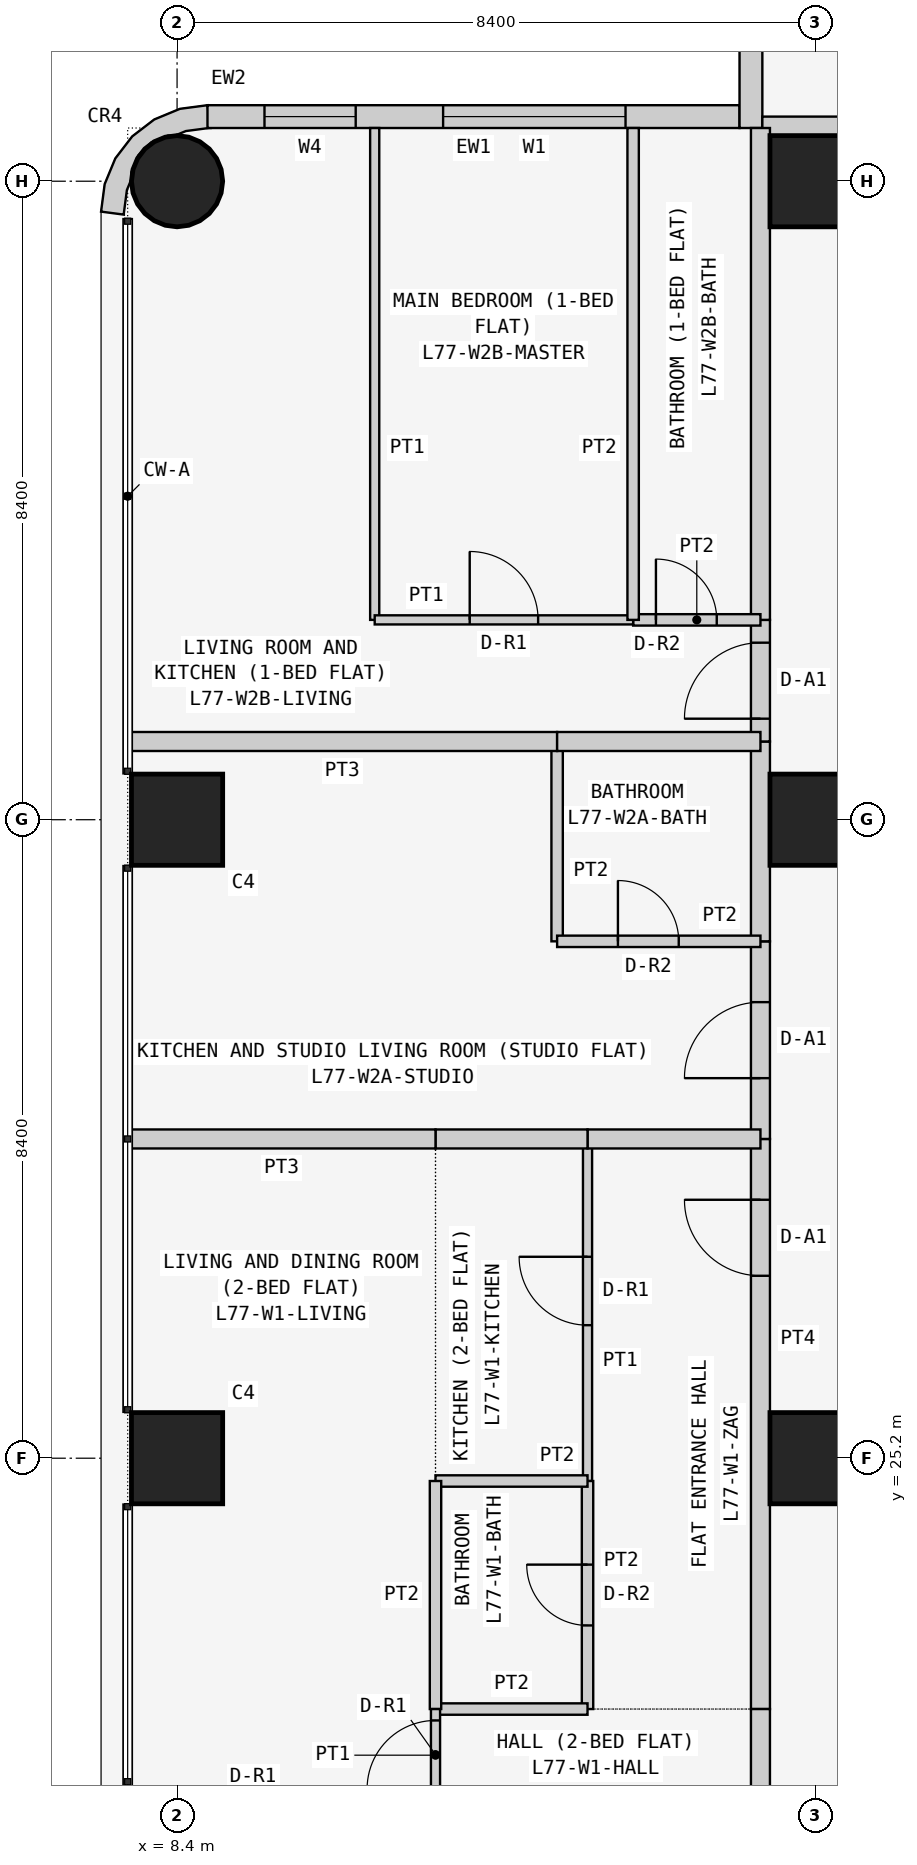
"""IFC4 building model, lengths in metres.
Left out: names, types, materials, properties, quantities, classifications, styles, units other than length and angle.
Written with IfcOpenShell. Run it as: python <this file> out.ifc"""

import sys

from ifc_helpers import new_model, si_unit, direction, frame, frame_2d, origin, origin_2d, place, context, subcontext, project, spatial, polyline, rectangle, circle, outline, extrude, element, fill, save


model = new_model("IFC4")
c1 = context("Model", 3, precision=1e-05, world=origin(), true_north=direction((0.0, 1.0)))
c2 = subcontext(c1, "Body", "Model", "MODEL_VIEW")
j1 = project(units=[si_unit("LENGTHUNIT", "METRE"), si_unit("PLANEANGLEUNIT", "RADIAN")], contexts=[c1])
p1 = place(None, origin())
s1 = spatial("IfcSite", under=j1, at=p1, CompositionType="ELEMENT")
p2 = place(p1, origin())
s2 = spatial("IfcBuilding", under=s1, at=p2, CompositionType="ELEMENT")
p3 = place(p2, frame((0.0, 0.0, 293.7)))
s3 = spatial("IfcBuildingStorey", under=s2, at=p3, CompositionType="ELEMENT", Elevation=293.7)
for number, where, z_axis, x_axis in (
    (1, (8.4, 25.2, 0.0), (0.0, 0.0, 1.0), (1.0, 0.0, 0.0)),
    (2, (8.4, 33.6, 0.0), (0.0, 0.0, 1.0), (1.0, 0.0, 0.0)),
):
    element("IfcColumn", number, at=place(p3, frame(where, z_axis=z_axis, x_axis=x_axis)), inside=s3, PredefinedType="COLUMN", context=c2, shape_type="SweptSolid", body=[
        extrude(rectangle(XDim=1.2, YDim=1.2, at=origin_2d()), origin(), (0.0, 0.0, 1.0), 3.6),
    ])
p4 = place(p3, frame((8.4, 42.0, 0.0), z_axis=(0.0, 0.0, 1.0), x_axis=(1.0, 0.0, 0.0)))
e3 = element("IfcColumn", 3, at=p4, inside=s3, PredefinedType="COLUMN", context=c2, shape_type="SweptSolid", body=[
    extrude(circle(Radius=0.6, at=origin_2d()), origin(), (0.0, 0.0, 1.0), 3.6),
])
for number, where, z_axis, x_axis in (
    (4, (16.8, 25.2, 0.0), (0.0, 0.0, 1.0), (1.0, 0.0, 0.0)),
    (5, (16.8, 33.6, 0.0), (0.0, 0.0, 1.0), (1.0, 0.0, 0.0)),
    (6, (16.8, 42.0, 0.0), (0.0, 0.0, 1.0), (1.0, 0.0, 0.0)),
):
    element("IfcColumn", number, at=place(p3, frame(where, z_axis=z_axis, x_axis=x_axis)), inside=s3, PredefinedType="COLUMN", context=c2, shape_type="SweptSolid", body=[
        extrude(rectangle(XDim=1.2, YDim=1.2, at=origin_2d()), origin(), (0.0, 0.0, 1.0), 3.6),
    ])
p5 = place(p3, frame((15.8, 42.85, 0.0), z_axis=(0.0, 0.0, 1.0), x_axis=(-1.0, 0.0, 0.0)))
e7 = element("IfcWall", 7, at=p5, inside=s3, PredefinedType="SOLIDWALL", context=c2, shape_type="SweptSolid", body=[
    extrude(rectangle(XDim=7.0, YDim=0.3, at=frame_2d((3.5, 0.0))), origin(), (0.0, 0.0, 1.0), 3.45),
])
p6 = place(p5, frame((1.5, 0.0, 0.9)))
e8 = element("IfcOpeningElement", 8, at=p6, cuts=e7, PredefinedType="OPENING", context=c2, shape_type="SweptSolid", body=[
    extrude(rectangle(XDim=2.4, YDim=1.5, at=frame_2d((1.2, 0.75))), frame((0.0, 0.16, 0.0), z_axis=(0.0, -1.0, 0.0), x_axis=(1.0, 0.0, 0.0)), (0.0, 0.0, 1.0), 0.32),
])
p7 = place(p5, frame((5.05, 0.0, 0.9)))
e9 = element("IfcOpeningElement", 9, at=p7, cuts=e7, PredefinedType="OPENING", context=c2, shape_type="SweptSolid", body=[
    extrude(rectangle(XDim=1.2, YDim=1.5, at=frame_2d((0.6, 0.75))), frame((0.0, 0.16, 0.0), z_axis=(0.0, -1.0, 0.0), x_axis=(1.0, 0.0, 0.0)), (0.0, 0.0, 1.0), 0.32),
])
p8 = place(p3, frame((15.95, 50.0, 0.0), z_axis=(0.0, 0.0, 1.0), x_axis=(0.0, -1.0, 0.0)))
e10 = element("IfcWall", 10, at=p8, inside=s3, PredefinedType="SOLIDWALL", context=c2, shape_type="SweptSolid", body=[
    extrude(rectangle(XDim=7.3, YDim=0.3, at=frame_2d((3.65, 0.0))), origin(), (0.0, 0.0, 1.0), 3.45),
])
p9 = place(p8, frame((3.1, 0.0, 0.9)))
e11 = element("IfcOpeningElement", 11, at=p9, cuts=e10, PredefinedType="OPENING", context=c2, shape_type="SweptSolid", body=[
    extrude(rectangle(XDim=2.4, YDim=1.5, at=frame_2d((1.2, 0.75))), frame((0.0, 0.16, 0.0), z_axis=(0.0, -1.0, 0.0), x_axis=(1.0, 0.0, 0.0)), (0.0, 0.0, 1.0), 0.32),
])
p10 = place(p8, frame((0.75, 0.0, 0.9)))
e12 = element("IfcOpeningElement", 12, at=p10, cuts=e10, PredefinedType="OPENING", context=c2, shape_type="SweptSolid", body=[
    extrude(rectangle(XDim=1.2, YDim=1.5, at=frame_2d((0.6, 0.75))), frame((0.0, 0.16, 0.0), z_axis=(0.0, -1.0, 0.0), x_axis=(1.0, 0.0, 0.0)), (0.0, 0.0, 1.0), 0.32),
])
p11 = place(p3, frame((8.762, 42.576, 0.0), z_axis=(0.0, 0.0, 1.0), x_axis=(-0.707106781187, 0.707106781187, 0.0)))
e13 = element("IfcWall", 13, at=p11, inside=s3, PredefinedType="SOLIDWALL", context=c2, shape_type="SweptSolid", body=[
    extrude(outline(polyline([(0.233, 0.114), (0.047, -0.129), (0.033, -0.143), (0.273, -0.327), (0.495, -0.037), (0.635, 0.3), (0.683, 0.663), (0.635, 1.025), (0.495, 1.363), (0.273, 1.653), (0.033, 1.469), (0.047, 1.455), (0.233, 1.212), (0.292, 1.069), (0.358, 1.003), (0.449, 0.783), (0.449, 0.543), (0.358, 0.322), (0.292, 0.257), (0.233, 0.114)])), origin(), (0.0, 0.0, 1.0), 3.45),
])
p12 = place(p3, frame((16.1, 42.725, 0.0), z_axis=(0.0, 0.0, 1.0), x_axis=(1.0, 0.0, 0.0)))
e14 = element("IfcWall", 14, at=p12, inside=s3, PredefinedType="PARTITIONING", context=c2, shape_type="SweptSolid", body=[
    extrude(rectangle(XDim=6.871, YDim=0.25, at=frame_2d((3.436, 0.0))), origin(), (0.0, 0.0, 1.0), 3.45),
])
p13 = place(p3, frame((16.075, 21.9, 0.0), z_axis=(0.0, 0.0, 1.0), x_axis=(0.0, 1.0, 0.0)))
e15 = element("IfcWall", 15, at=p13, inside=s3, PredefinedType="PARTITIONING", context=c2, shape_type="SweptSolid", body=[
    extrude(rectangle(XDim=7.5, YDim=0.25, at=frame_2d((3.75, 0.0))), origin(), (0.0, 0.0, 1.0), 3.45),
])
p14 = place(p13, frame((5.7, 0.0, 0.0)))
e16 = element("IfcOpeningElement", 16, at=p14, cuts=e15, PredefinedType="OPENING", context=c2, shape_type="SweptSolid", body=[
    extrude(rectangle(XDim=1.0, YDim=2.1, at=frame_2d((0.5, 1.05))), frame((0.0, 0.135, 0.0), z_axis=(0.0, -1.0, 0.0), x_axis=(1.0, 0.0, 0.0)), (0.0, 0.0, 1.0), 0.27),
])
p15 = place(p3, frame((16.075, 20.686, 0.0), z_axis=(0.0, 0.0, 1.0), x_axis=(0.0, 1.0, 0.0)))
e17 = element("IfcWall", 17, at=p15, inside=s3, PredefinedType="PARTITIONING", context=c2, shape_type="SweptSolid", body=[
    extrude(rectangle(XDim=1.214, YDim=0.25, at=frame_2d((0.607, 0.0))), origin(), (0.0, 0.0, 1.0), 3.45),
])
p16 = place(p3, frame((16.075, 29.4, 0.0), z_axis=(0.0, 0.0, 1.0), x_axis=(0.0, 1.0, 0.0)))
e18 = element("IfcWall", 18, at=p16, inside=s3, PredefinedType="PARTITIONING", context=c2, shape_type="SweptSolid", body=[
    extrude(rectangle(XDim=2.6, YDim=0.25, at=frame_2d((1.3, 0.0))), origin(), (0.0, 0.0, 1.0), 3.45),
])
p17 = place(p16, frame((0.8, 0.0, 0.0)))
e19 = element("IfcOpeningElement", 19, at=p17, cuts=e18, PredefinedType="OPENING", context=c2, shape_type="SweptSolid", body=[
    extrude(rectangle(XDim=1.0, YDim=2.1, at=frame_2d((0.5, 1.05))), frame((0.0, 0.135, 0.0), z_axis=(0.0, -1.0, 0.0), x_axis=(1.0, 0.0, 0.0)), (0.0, 0.0, 1.0), 0.27),
])
p18 = place(p3, frame((16.075, 32.0, 0.0), z_axis=(0.0, 0.0, 1.0), x_axis=(0.0, 1.0, 0.0)))
e20 = element("IfcWall", 20, at=p18, inside=s3, PredefinedType="PARTITIONING", context=c2, shape_type="SweptSolid", body=[
    extrude(rectangle(XDim=2.629, YDim=0.25, at=frame_2d((1.314, 0.0))), origin(), (0.0, 0.0, 1.0), 3.45),
])
p19 = place(p3, frame((16.075, 34.629, 0.0), z_axis=(0.0, 0.0, 1.0), x_axis=(0.0, 1.0, 0.0)))
e21 = element("IfcWall", 21, at=p19, inside=s3, PredefinedType="PARTITIONING", context=c2, shape_type="SweptSolid", body=[
    extrude(rectangle(XDim=1.6, YDim=0.25, at=frame_2d((0.8, 0.0))), origin(), (0.0, 0.0, 1.0), 3.45),
])
p20 = place(p19, frame((0.3, 0.0, 0.0)))
e22 = element("IfcOpeningElement", 22, at=p20, cuts=e21, PredefinedType="OPENING", context=c2, shape_type="SweptSolid", body=[
    extrude(rectangle(XDim=1.0, YDim=2.1, at=frame_2d((0.5, 1.05))), frame((0.0, 0.135, 0.0), z_axis=(0.0, -1.0, 0.0), x_axis=(1.0, 0.0, 0.0)), (0.0, 0.0, 1.0), 0.27),
])
p21 = place(p3, frame((16.075, 36.229, 0.0), z_axis=(0.0, 0.0, 1.0), x_axis=(0.0, 1.0, 0.0)))
e23 = element("IfcWall", 23, at=p21, inside=s3, PredefinedType="PARTITIONING", context=c2, shape_type="SweptSolid", body=[
    extrude(rectangle(XDim=6.471, YDim=0.25, at=frame_2d((3.235, 0.0))), origin(), (0.0, 0.0, 1.0), 3.45),
])
p22 = place(p3, frame((13.8, 29.4, 0.0), z_axis=(0.0, 0.0, 1.0), x_axis=(0.0, -1.0, 0.0)))
e24 = element("IfcWall", 24, at=p22, inside=s3, PredefinedType="PARTITIONING", context=c2, shape_type="SweptSolid", body=[
    extrude(rectangle(XDim=4.5, YDim=0.12, at=frame_2d((2.25, 0.0))), origin(), (0.0, 0.0, 1.0), 3.45),
])
p23 = place(p22, frame((1.55, 0.0, 0.0)))
e25 = element("IfcOpeningElement", 25, at=p23, cuts=e24, PredefinedType="OPENING", context=c2, shape_type="SweptSolid", body=[
    extrude(rectangle(XDim=0.9, YDim=2.1, at=frame_2d((0.45, 1.05))), frame((0.0, 0.07, 0.0), z_axis=(0.0, -1.0, 0.0), x_axis=(1.0, 0.0, 0.0)), (0.0, 0.0, 1.0), 0.14),
])
p24 = place(p3, frame((13.8, 24.9, 0.0), z_axis=(0.0, 0.0, 1.0), x_axis=(0.0, -1.0, 0.0)))
e26 = element("IfcWall", 26, at=p24, inside=s3, PredefinedType="PARTITIONING", context=c2, shape_type="SweptSolid", body=[
    extrude(rectangle(XDim=3.0, YDim=0.15, at=frame_2d((1.5, 0.0))), origin(), (0.0, 0.0, 1.0), 3.45),
])
p25 = place(p24, frame((1.1, 0.0, 0.0)))
e27 = element("IfcOpeningElement", 27, at=p25, cuts=e26, PredefinedType="OPENING", context=c2, shape_type="SweptSolid", body=[
    extrude(rectangle(XDim=0.8, YDim=2.1, at=frame_2d((0.4, 1.05))), frame((0.0, 0.085, 0.0), z_axis=(0.0, -1.0, 0.0), x_axis=(1.0, 0.0, 0.0)), (0.0, 0.0, 1.0), 0.17),
])
p26 = place(p3, frame((16.075, 29.4, 0.0), z_axis=(0.0, 0.0, 1.0), x_axis=(-1.0, 0.0, 0.0)))
e28 = element("IfcWall", 28, at=p26, inside=s3, PredefinedType="PARTITIONING", context=c2, shape_type="SweptSolid", body=[
    extrude(rectangle(XDim=2.275, YDim=0.25, at=frame_2d((1.137, 0.0))), origin(), (0.0, 0.0, 1.0), 3.45),
])
p27 = place(p3, frame((11.8, 24.9, 0.0), z_axis=(0.0, 0.0, 1.0), x_axis=(1.0, 0.0, 0.0)))
e29 = element("IfcWall", 29, at=p27, inside=s3, PredefinedType="PARTITIONING", context=c2, shape_type="SweptSolid", body=[
    extrude(rectangle(XDim=2.0, YDim=0.15, at=frame_2d((1.0, 0.0))), origin(), (0.0, 0.0, 1.0), 3.45),
])
p28 = place(p3, frame((13.8, 29.4, 0.0), z_axis=(0.0, 0.0, 1.0), x_axis=(-1.0, 0.0, 0.0)))
e30 = element("IfcWall", 30, at=p28, inside=s3, PredefinedType="PARTITIONING", context=c2, shape_type="SweptSolid", body=[
    extrude(rectangle(XDim=2.0, YDim=0.25, at=frame_2d((1.0, 0.0))), origin(), (0.0, 0.0, 1.0), 3.45),
])
p29 = place(p3, frame((11.8, 21.9, 0.0), z_axis=(0.0, 0.0, 1.0), x_axis=(1.0, 0.0, 0.0)))
e31 = element("IfcWall", 31, at=p29, inside=s3, PredefinedType="PARTITIONING", context=c2, shape_type="SweptSolid", body=[
    extrude(rectangle(XDim=2.0, YDim=0.15, at=frame_2d((1.0, 0.0))), origin(), (0.0, 0.0, 1.0), 3.45),
])
p30 = place(p3, frame((11.8, 24.9, 0.0), z_axis=(0.0, 0.0, 1.0), x_axis=(0.0, -1.0, 0.0)))
e32 = element("IfcWall", 32, at=p30, inside=s3, PredefinedType="PARTITIONING", context=c2, shape_type="SweptSolid", body=[
    extrude(rectangle(XDim=3.0, YDim=0.15, at=frame_2d((1.5, 0.0))), origin(), (0.0, 0.0, 1.0), 3.45),
])
p31 = place(p3, frame((11.8, 21.9, 0.0), z_axis=(0.0, 0.0, 1.0), x_axis=(0.0, -1.0, 0.0)))
e33 = element("IfcWall", 33, at=p31, inside=s3, PredefinedType="PARTITIONING", context=c2, shape_type="SweptSolid", body=[
    extrude(rectangle(XDim=1.214, YDim=0.12, at=frame_2d((0.607, 0.0))), origin(), (0.0, 0.0, 1.0), 3.45),
])
p32 = place(p31, frame((0.15, 0.0, 0.0)))
e34 = element("IfcOpeningElement", 34, at=p32, cuts=e33, PredefinedType="OPENING", context=c2, shape_type="SweptSolid", body=[
    extrude(rectangle(XDim=0.9, YDim=2.1, at=frame_2d((0.45, 1.05))), frame((0.0, 0.07, 0.0), z_axis=(0.0, -1.0, 0.0), x_axis=(1.0, 0.0, 0.0)), (0.0, 0.0, 1.0), 0.14),
])
p33 = place(p3, frame((11.8, 29.4, 0.0), z_axis=(0.0, 0.0, 1.0), x_axis=(-1.0, 0.0, 0.0)))
e35 = element("IfcWall", 35, at=p33, inside=s3, PredefinedType="PARTITIONING", context=c2, shape_type="SweptSolid", body=[
    extrude(rectangle(XDim=4.05, YDim=0.25, at=frame_2d((2.025, 0.0))), origin(), (0.0, 0.0, 1.0), 3.45),
])
p34 = place(p3, frame((13.4, 34.629, 0.0), z_axis=(0.0, 0.0, 1.0), x_axis=(0.0, -1.0, 0.0)))
e36 = element("IfcWall", 36, at=p34, inside=s3, PredefinedType="PARTITIONING", context=c2, shape_type="SweptSolid", body=[
    extrude(rectangle(XDim=2.629, YDim=0.15, at=frame_2d((1.314, 0.0))), origin(), (0.0, 0.0, 1.0), 3.45),
])
p35 = place(p3, frame((13.4, 32.0, 0.0), z_axis=(0.0, 0.0, 1.0), x_axis=(1.0, 0.0, 0.0)))
e37 = element("IfcWall", 37, at=p35, inside=s3, PredefinedType="PARTITIONING", context=c2, shape_type="SweptSolid", body=[
    extrude(rectangle(XDim=2.675, YDim=0.15, at=frame_2d((1.337, 0.0))), origin(), (0.0, 0.0, 1.0), 3.45),
])
p36 = place(p35, frame((0.8, 0.0, 0.0)))
e38 = element("IfcOpeningElement", 38, at=p36, cuts=e37, PredefinedType="OPENING", context=c2, shape_type="SweptSolid", body=[
    extrude(rectangle(XDim=0.8, YDim=2.1, at=frame_2d((0.4, 1.05))), frame((0.0, 0.085, 0.0), z_axis=(0.0, -1.0, 0.0), x_axis=(1.0, 0.0, 0.0)), (0.0, 0.0, 1.0), 0.17),
])
p37 = place(p3, frame((7.75, 34.629, 0.0), z_axis=(0.0, 0.0, 1.0), x_axis=(1.0, 0.0, 0.0)))
e39 = element("IfcWall", 39, at=p37, inside=s3, PredefinedType="PARTITIONING", context=c2, shape_type="SweptSolid", body=[
    extrude(rectangle(XDim=5.65, YDim=0.25, at=frame_2d((2.825, 0.0))), origin(), (0.0, 0.0, 1.0), 3.45),
])
p38 = place(p3, frame((13.4, 34.629, 0.0), z_axis=(0.0, 0.0, 1.0), x_axis=(1.0, 0.0, 0.0)))
e40 = element("IfcWall", 40, at=p38, inside=s3, PredefinedType="PARTITIONING", context=c2, shape_type="SweptSolid", body=[
    extrude(rectangle(XDim=2.675, YDim=0.25, at=frame_2d((1.337, 0.0))), origin(), (0.0, 0.0, 1.0), 3.45),
])
p39 = place(p3, frame((14.4, 36.229, 0.0), z_axis=(0.0, 0.0, 1.0), x_axis=(1.0, 0.0, 0.0)))
e41 = element("IfcWall", 41, at=p39, inside=s3, PredefinedType="PARTITIONING", context=c2, shape_type="SweptSolid", body=[
    extrude(rectangle(XDim=1.675, YDim=0.15, at=frame_2d((0.837, 0.0))), origin(), (0.0, 0.0, 1.0), 3.45),
])
p40 = place(p39, frame((0.3, 0.0, 0.0)))
e42 = element("IfcOpeningElement", 42, at=p40, cuts=e41, PredefinedType="OPENING", context=c2, shape_type="SweptSolid", body=[
    extrude(rectangle(XDim=0.8, YDim=2.1, at=frame_2d((0.4, 1.05))), frame((0.0, 0.085, 0.0), z_axis=(0.0, -1.0, 0.0), x_axis=(1.0, 0.0, 0.0)), (0.0, 0.0, 1.0), 0.17),
])
p41 = place(p3, frame((11.0, 42.7, 0.0), z_axis=(0.0, 0.0, 1.0), x_axis=(0.0, -1.0, 0.0)))
e43 = element("IfcWall", 43, at=p41, inside=s3, PredefinedType="PARTITIONING", context=c2, shape_type="SweptSolid", body=[
    extrude(rectangle(XDim=6.471, YDim=0.12, at=frame_2d((3.235, 0.0))), origin(), (0.0, 0.0, 1.0), 3.45),
])
p42 = place(p3, frame((11.0, 36.229, 0.0), z_axis=(0.0, 0.0, 1.0), x_axis=(1.0, 0.0, 0.0)))
e44 = element("IfcWall", 44, at=p42, inside=s3, PredefinedType="PARTITIONING", context=c2, shape_type="SweptSolid", body=[
    extrude(rectangle(XDim=3.4, YDim=0.12, at=frame_2d((1.7, 0.0))), origin(), (0.0, 0.0, 1.0), 3.45),
])
p43 = place(p42, frame((1.25, 0.0, 0.0)))
e45 = element("IfcOpeningElement", 45, at=p43, cuts=e44, PredefinedType="OPENING", context=c2, shape_type="SweptSolid", body=[
    extrude(rectangle(XDim=0.9, YDim=2.1, at=frame_2d((0.45, 1.05))), frame((0.0, 0.07, 0.0), z_axis=(0.0, -1.0, 0.0), x_axis=(1.0, 0.0, 0.0)), (0.0, 0.0, 1.0), 0.14),
])
p44 = place(p3, frame((14.4, 36.229, 0.0), z_axis=(0.0, 0.0, 1.0), x_axis=(0.0, 1.0, 0.0)))
e46 = element("IfcWall", 46, at=p44, inside=s3, PredefinedType="PARTITIONING", context=c2, shape_type="SweptSolid", body=[
    extrude(rectangle(XDim=6.471, YDim=0.15, at=frame_2d((3.235, 0.0))), origin(), (0.0, 0.0, 1.0), 3.45),
])
p45 = place(p6, origin())
e47 = element("IfcWindow", 47, at=p45, inside=s3, PartitioningType="SINGLE_PANEL", PredefinedType="WINDOW", context=c2, shape_type="SweptSolid", body=[
    extrude(rectangle(XDim=2.4, YDim=1.5, at=frame_2d((1.2, 0.75))), frame((0.0, 0.03, 0.0), z_axis=(0.0, -1.0, 0.0), x_axis=(1.0, 0.0, 0.0)), (0.0, 0.0, 1.0), 0.06),
])
fill(e8, e47)
p46 = place(p7, origin())
e48 = element("IfcWindow", 48, at=p46, inside=s3, PartitioningType="SINGLE_PANEL", PredefinedType="WINDOW", context=c2, shape_type="SweptSolid", body=[
    extrude(rectangle(XDim=1.2, YDim=1.5, at=frame_2d((0.6, 0.75))), frame((0.0, 0.03, 0.0), z_axis=(0.0, -1.0, 0.0), x_axis=(1.0, 0.0, 0.0)), (0.0, 0.0, 1.0), 0.06),
])
fill(e9, e48)
p47 = place(p14, origin())
e49 = element("IfcDoor", 49, at=p47, inside=s3, OperationType="SINGLE_SWING_RIGHT", PredefinedType="DOOR", context=c2, shape_type="SweptSolid", body=[
    extrude(rectangle(XDim=1.0, YDim=2.1, at=frame_2d((0.5, 1.05))), frame((0.0, 0.025, 0.0), z_axis=(0.0, -1.0, 0.0), x_axis=(1.0, 0.0, 0.0)), (0.0, 0.0, 1.0), 0.05),
])
fill(e16, e49)
p48 = place(p23, frame((0.9, 0.0, 0.0), z_axis=(0.0, 0.0, 1.0), x_axis=(-1.0, 0.0, 0.0)))
e50 = element("IfcDoor", 50, at=p48, inside=s3, OperationType="SINGLE_SWING_RIGHT", PredefinedType="DOOR", context=c2, shape_type="SweptSolid", body=[
    extrude(rectangle(XDim=0.9, YDim=2.1, at=frame_2d((0.45, 1.05))), frame((0.0, 0.025, 0.0), z_axis=(0.0, -1.0, 0.0), x_axis=(1.0, 0.0, 0.0)), (0.0, 0.0, 1.0), 0.05),
])
fill(e25, e50)
p49 = place(p25, frame((0.8, 0.0, 0.0), z_axis=(0.0, 0.0, 1.0), x_axis=(-1.0, 0.0, 0.0)))
e51 = element("IfcDoor", 51, at=p49, inside=s3, OperationType="SINGLE_SWING_RIGHT", PredefinedType="DOOR", context=c2, shape_type="SweptSolid", body=[
    extrude(rectangle(XDim=0.8, YDim=2.1, at=frame_2d((0.4, 1.05))), frame((0.0, 0.025, 0.0), z_axis=(0.0, -1.0, 0.0), x_axis=(1.0, 0.0, 0.0)), (0.0, 0.0, 1.0), 0.05),
])
fill(e27, e51)
p50 = place(p32, frame((0.9, 0.0, 0.0), z_axis=(0.0, 0.0, 1.0), x_axis=(-1.0, 0.0, 0.0)))
e52 = element("IfcDoor", 52, at=p50, inside=s3, OperationType="SINGLE_SWING_LEFT", PredefinedType="DOOR", context=c2, shape_type="SweptSolid", body=[
    extrude(rectangle(XDim=0.9, YDim=2.1, at=frame_2d((0.45, 1.05))), frame((0.0, 0.025, 0.0), z_axis=(0.0, -1.0, 0.0), x_axis=(1.0, 0.0, 0.0)), (0.0, 0.0, 1.0), 0.05),
])
fill(e34, e52)
p51 = place(p17, origin())
e53 = element("IfcDoor", 53, at=p51, inside=s3, OperationType="SINGLE_SWING_LEFT", PredefinedType="DOOR", context=c2, shape_type="SweptSolid", body=[
    extrude(rectangle(XDim=1.0, YDim=2.1, at=frame_2d((0.5, 1.05))), frame((0.0, 0.025, 0.0), z_axis=(0.0, -1.0, 0.0), x_axis=(1.0, 0.0, 0.0)), (0.0, 0.0, 1.0), 0.05),
])
fill(e19, e53)
p52 = place(p36, origin())
e54 = element("IfcDoor", 54, at=p52, inside=s3, OperationType="SINGLE_SWING_LEFT", PredefinedType="DOOR", context=c2, shape_type="SweptSolid", body=[
    extrude(rectangle(XDim=0.8, YDim=2.1, at=frame_2d((0.4, 1.05))), frame((0.0, 0.025, 0.0), z_axis=(0.0, -1.0, 0.0), x_axis=(1.0, 0.0, 0.0)), (0.0, 0.0, 1.0), 0.05),
])
fill(e38, e54)
p53 = place(p20, origin())
e55 = element("IfcDoor", 55, at=p53, inside=s3, OperationType="SINGLE_SWING_LEFT", PredefinedType="DOOR", context=c2, shape_type="SweptSolid", body=[
    extrude(rectangle(XDim=1.0, YDim=2.1, at=frame_2d((0.5, 1.05))), frame((0.0, 0.025, 0.0), z_axis=(0.0, -1.0, 0.0), x_axis=(1.0, 0.0, 0.0)), (0.0, 0.0, 1.0), 0.05),
])
fill(e22, e55)
p54 = place(p40, origin())
e56 = element("IfcDoor", 56, at=p54, inside=s3, OperationType="SINGLE_SWING_LEFT", PredefinedType="DOOR", context=c2, shape_type="SweptSolid", body=[
    extrude(rectangle(XDim=0.8, YDim=2.1, at=frame_2d((0.4, 1.05))), frame((0.0, 0.025, 0.0), z_axis=(0.0, -1.0, 0.0), x_axis=(1.0, 0.0, 0.0)), (0.0, 0.0, 1.0), 0.05),
])
fill(e42, e56)
p55 = place(p43, origin())
e57 = element("IfcDoor", 57, at=p55, inside=s3, OperationType="SINGLE_SWING_LEFT", PredefinedType="DOOR", context=c2, shape_type="SweptSolid", body=[
    extrude(rectangle(XDim=0.9, YDim=2.1, at=frame_2d((0.45, 1.05))), frame((0.0, 0.025, 0.0), z_axis=(0.0, -1.0, 0.0), x_axis=(1.0, 0.0, 0.0)), (0.0, 0.0, 1.0), 0.05),
])
fill(e45, e57)
save(model, sys.argv[1])
